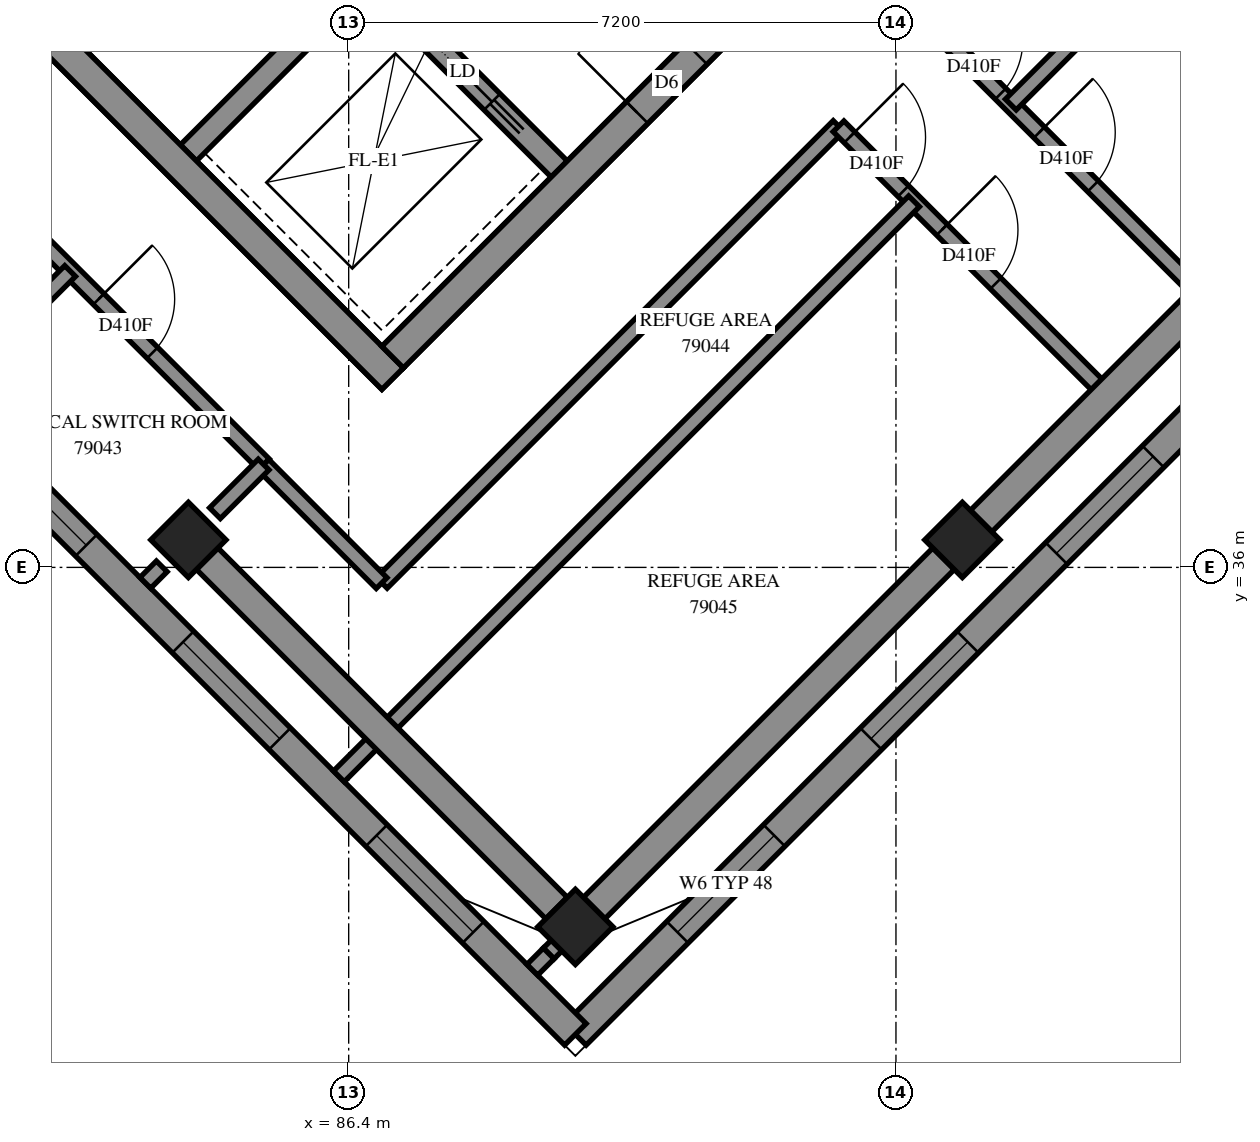
"""IFC4 building model, lengths in metres.
Left out: names, types, materials, properties, quantities, classifications, styles, units other than length and angle.
Written with IfcOpenShell. Run it as: python <this file> out.ifc"""

import sys

from ifc_helpers import new_model, si_unit, direction, frame, frame_2d, origin, origin_2d, place, context, subcontext, project, spatial, polyline, rectangle, outline, extrude, element, fill, save


model = new_model("IFC4")
c1 = context("Model", 3, precision=1e-05, world=origin(), true_north=direction((0.0, 1.0)))
c2 = subcontext(c1, "Body", "Model", "MODEL_VIEW")
j1 = project(units=[si_unit("LENGTHUNIT", "METRE"), si_unit("PLANEANGLEUNIT", "RADIAN")], contexts=[c1])
p1 = place(None, origin())
s1 = spatial("IfcSite", under=j1, at=p1, CompositionType="ELEMENT")
p2 = place(p1, origin())
s2 = spatial("IfcBuilding", under=s1, at=p2, CompositionType="ELEMENT")
p3 = place(p2, frame((0.0, 0.0, 290.6)))
s3 = spatial("IfcBuildingStorey", under=s2, at=p3, CompositionType="ELEMENT", Elevation=290.6)
for number, where, z_axis, x_axis in (
    (1, (84.291, 36.362, 0.0), (0.0, 0.0, 1.0), (0.707, -0.707, 0.0)),
    (2, (94.474, 36.362, 0.0), (0.0, 0.0, 1.0), (0.707, -0.707, 0.0)),
    (3, (89.382, 31.271, 0.0), (0.0, 0.0, 1.0), (0.707, -0.707, 0.0)),
):
    element("IfcColumn", number, at=place(p3, frame(where, z_axis=z_axis, x_axis=x_axis)), inside=s3, PredefinedType="COLUMN", context=c2, shape_type="SweptSolid", body=[
        extrude(rectangle(XDim=0.7, YDim=0.7, at=origin_2d()), origin(), (0.0, 0.0, 1.0), 3.5),
    ])
p4 = place(p3, frame((76.23, 49.231, -0.3), z_axis=(0.0, 0.0, 1.0), x_axis=(0.7071034917, -0.7071100706, 0.0)))
e4 = element("IfcWall", 4, at=p4, inside=s3, PredefinedType="SHEAR", context=c2, shape_type="SweptSolid", body=[
    extrude(rectangle(XDim=15.2, YDim=0.4, at=frame_2d((7.6, 0.0))), origin(), (0.0, 0.0, 1.0), 3.1),
])
p5 = place(p3, frame((86.978, 38.766, -0.3), z_axis=(0.0, 0.0, 1.0), x_axis=(0.7071067812, 0.7071067812, 0.0)))
e5 = element("IfcWall", 5, at=p5, inside=s3, PredefinedType="SHEAR", context=c2, shape_type="SweptSolid", body=[
    extrude(rectangle(XDim=14.4, YDim=0.4, at=frame_2d((7.2, 0.0))), origin(), (0.0, 0.0, 1.0), 3.1),
])
p6 = place(p5, frame((4.55, 0.0, 0.3)))
e6 = element("IfcOpeningElement", 6, at=p6, cuts=e5, PredefinedType="OPENING", context=c2, shape_type="SweptSolid", body=[
    extrude(rectangle(XDim=1.1, YDim=2.1, at=frame_2d((0.55, 1.05))), frame((0.0, 0.21, 0.0), z_axis=(0.0, -1.0, 0.0), x_axis=(1.0, 0.0, 0.0)), (0.0, 0.0, 1.0), 0.42),
])
p7 = place(p5, frame((11.35, 0.0, 0.3)))
e7 = element("IfcOpeningElement", 7, at=p7, cuts=e5, PredefinedType="OPENING", context=c2, shape_type="SweptSolid", body=[
    extrude(rectangle(XDim=1.1, YDim=2.1, at=frame_2d((0.55, 1.05))), frame((0.0, 0.21, 0.0), z_axis=(0.0, -1.0, 0.0), x_axis=(1.0, 0.0, 0.0)), (0.0, 0.0, 1.0), 0.42),
])
p8 = place(p3, frame((84.291, 41.453, 0.0), z_axis=(0.0, 0.0, 1.0), x_axis=(0.7071067812, 0.7071067812, 0.0)))
e8 = element("IfcWall", 8, at=p8, inside=s3, PredefinedType="SOLIDWALL", context=c2, shape_type="SweptSolid", body=[
    extrude(rectangle(XDim=3.3, YDim=0.3, at=frame_2d((1.65, 0.0))), origin(), (0.0, 0.0, 1.0), 3.5),
])
p9 = place(p3, frame((78.988, 51.423, 0.0), z_axis=(0.0, 0.0, 1.0), x_axis=(0.7071067812, -0.7071067812, 0.0)))
e9 = element("IfcWall", 9, at=p9, inside=s3, PredefinedType="SOLIDWALL", context=c2, shape_type="SweptSolid", body=[
    extrude(rectangle(XDim=14.4, YDim=0.3, at=frame_2d((7.2, 0.0))), origin(), (0.0, 0.0, 1.0), 3.5),
])
p10 = place(p9, frame((12.05, 0.0, 0.0)))
e10 = element("IfcOpeningElement", 10, at=p10, cuts=e9, PredefinedType="OPENING", context=c2, shape_type="SweptSolid", body=[
    extrude(rectangle(XDim=1.1, YDim=2.1, at=frame_2d((0.55, 1.05))), frame((0.0, 0.16, 0.0), z_axis=(0.0, -1.0, 0.0), x_axis=(1.0, 0.0, 0.0)), (0.0, 0.0, 1.0), 0.32),
])
p11 = place(p3, frame((89.382, 29.856, 0.0), z_axis=(0.0, 0.0, 1.0), x_axis=(0.7071094407, 0.7071041216, 0.0)))
e11 = element("IfcWall", 11, at=p11, inside=s3, PredefinedType="SOLIDWALL", context=c2, shape_type="SweptSolid", body=[
    extrude(outline(polyline([(-0.2, -0.2), (19.0, -0.2), (18.6, 0.2), (0.2, 0.2), (-0.2, -0.2)])), origin(), (0.0, 0.0, 1.0), 3.0),
])
p12 = place(p11, frame((1.9, 0.0, 0.7)))
e12 = element("IfcOpeningElement", 12, at=p12, cuts=e11, PredefinedType="OPENING", context=c2, shape_type="SweptSolid", body=[
    extrude(rectangle(XDim=1.8, YDim=2.2, at=frame_2d((0.9, 1.1))), frame((0.0, 0.21, 0.0), z_axis=(0.0, -1.0, 0.0), x_axis=(1.0, 0.0, 0.0)), (0.0, 0.0, 1.0), 0.42),
])
p13 = place(p11, frame((5.5, 0.0, 0.7)))
e13 = element("IfcOpeningElement", 13, at=p13, cuts=e11, PredefinedType="OPENING", context=c2, shape_type="SweptSolid", body=[
    extrude(rectangle(XDim=1.8, YDim=2.2, at=frame_2d((0.9, 1.1))), frame((0.0, 0.21, 0.0), z_axis=(0.0, -1.0, 0.0), x_axis=(1.0, 0.0, 0.0)), (0.0, 0.0, 1.0), 0.42),
])
p14 = place(p11, frame((8.95, 0.0, 0.7)))
e14 = element("IfcOpeningElement", 14, at=p14, cuts=e11, PredefinedType="OPENING", context=c2, shape_type="SweptSolid", body=[
    extrude(rectangle(XDim=1.8, YDim=2.2, at=frame_2d((0.9, 1.1))), frame((0.0, 0.21, 0.0), z_axis=(0.0, -1.0, 0.0), x_axis=(1.0, 0.0, 0.0)), (0.0, 0.0, 1.0), 0.42),
])
p15 = place(p11, frame((12.85, 0.0, 0.7)))
e15 = element("IfcOpeningElement", 15, at=p15, cuts=e11, PredefinedType="OPENING", context=c2, shape_type="SweptSolid", body=[
    extrude(rectangle(XDim=1.8, YDim=2.2, at=frame_2d((0.9, 1.1))), frame((0.0, 0.21, 0.0), z_axis=(0.0, -1.0, 0.0), x_axis=(1.0, 0.0, 0.0)), (0.0, 0.0, 1.0), 0.42),
])
p16 = place(p11, frame((16.0, 0.0, 0.7)))
e16 = element("IfcOpeningElement", 16, at=p16, cuts=e11, PredefinedType="OPENING", context=c2, shape_type="SweptSolid", body=[
    extrude(rectangle(XDim=1.8, YDim=2.2, at=frame_2d((0.9, 1.1))), frame((0.0, 0.21, 0.0), z_axis=(0.0, -1.0, 0.0), x_axis=(1.0, 0.0, 0.0)), (0.0, 0.0, 1.0), 0.42),
])
p17 = place(p3, frame((78.297, 40.941, 0.0), z_axis=(0.0, 0.0, 1.0), x_axis=(0.7071035917, -0.7071099707, 0.0)))
e17 = element("IfcWall", 17, at=p17, inside=s3, PredefinedType="SOLIDWALL", context=c2, shape_type="SweptSolid", body=[
    extrude(outline(polyline([(0.047, -0.2), (15.877, -0.2), (15.476, 0.2), (-0.047, 0.2), (0.047, -0.2)])), origin(), (0.0, 0.0, 1.0), 3.5),
])
p18 = place(p17, frame((1.138, 0.0, 0.7)))
e18 = element("IfcOpeningElement", 18, at=p18, cuts=e17, PredefinedType="OPENING", context=c2, shape_type="SweptSolid", body=[
    extrude(rectangle(XDim=1.8, YDim=2.2, at=frame_2d((0.9, 1.1))), frame((0.0, 0.21, 0.0), z_axis=(0.0, -1.0, 0.0), x_axis=(1.0, 0.0, 0.0)), (0.0, 0.0, 1.0), 0.42),
])
p19 = place(p17, frame((4.777, 0.0, 0.7)))
e19 = element("IfcOpeningElement", 19, at=p19, cuts=e17, PredefinedType="OPENING", context=c2, shape_type="SweptSolid", body=[
    extrude(rectangle(XDim=1.8, YDim=2.2, at=frame_2d((0.9, 1.1))), frame((0.0, 0.21, 0.0), z_axis=(0.0, -1.0, 0.0), x_axis=(1.0, 0.0, 0.0)), (0.0, 0.0, 1.0), 0.42),
])
p20 = place(p17, frame((8.377, 0.0, 0.7)))
e20 = element("IfcOpeningElement", 20, at=p20, cuts=e17, PredefinedType="OPENING", context=c2, shape_type="SweptSolid", body=[
    extrude(rectangle(XDim=1.8, YDim=2.2, at=frame_2d((0.9, 1.1))), frame((0.0, 0.21, 0.0), z_axis=(0.0, -1.0, 0.0), x_axis=(1.0, 0.0, 0.0)), (0.0, 0.0, 1.0), 0.42),
])
p21 = place(p17, frame((11.976, 0.0, 0.7)))
e21 = element("IfcOpeningElement", 21, at=p21, cuts=e17, PredefinedType="OPENING", context=c2, shape_type="SweptSolid", body=[
    extrude(rectangle(XDim=1.8, YDim=2.2, at=frame_2d((0.9, 1.1))), frame((0.0, 0.21, 0.0), z_axis=(0.0, -1.0, 0.0), x_axis=(1.0, 0.0, 0.0)), (0.0, 0.0, 1.0), 0.42),
])
p22 = place(p3, frame((86.835, 35.797, 0.0), z_axis=(0.0, 0.0, 1.0), x_axis=(0.7071067812, 0.7071067812, 0.0)))
e22 = element("IfcWall", 22, at=p22, inside=s3, PredefinedType="PARTITIONING", context=c2, shape_type="SweptSolid", body=[
    extrude(rectangle(XDim=8.499, YDim=0.2, at=frame_2d((4.25, 0.0))), origin(), (0.0, 0.0, 1.0), 3.5),
])
p23 = place(p3, frame((89.031, 30.921, 0.0), z_axis=(0.0, 0.0, 1.0), x_axis=(0.7071067812, 0.7071067812, 0.0)))
e23 = element("IfcWall", 23, at=p23, inside=s3, PredefinedType="PARTITIONING", context=c2, shape_type="SweptSolid", body=[
    extrude(rectangle(XDim=8.191, YDim=0.2, at=frame_2d((4.096, 0.0))), origin(), (0.0, 0.0, 1.0), 3.0),
])
p24 = place(p3, frame((94.124, 43.084, 0.0), z_axis=(0.0, 0.0, 1.0), x_axis=(0.7071067812, -0.7071067812, 0.0)))
e24 = element("IfcWall", 24, at=p24, inside=s3, PredefinedType="PARTITIONING", context=c2, shape_type="SweptSolid", body=[
    extrude(rectangle(XDim=5.001, YDim=0.2, at=frame_2d((2.5, 0.0))), origin(), (0.0, 0.0, 1.0), 3.5),
])
p25 = place(p24, frame((0.206, 0.0, 0.0)))
e25 = element("IfcOpeningElement", 25, at=p25, cuts=e24, PredefinedType="OPENING", context=c2, shape_type="SweptSolid", body=[
    extrude(rectangle(XDim=1.0, YDim=2.1, at=frame_2d((0.5, 1.05))), frame((0.0, 0.11, 0.0), z_axis=(0.0, -1.0, 0.0), x_axis=(1.0, 0.0, 0.0)), (0.0, 0.0, 1.0), 0.22),
])
p26 = place(p24, frame((1.925, 0.0, 0.0)))
e26 = element("IfcOpeningElement", 26, at=p26, cuts=e24, PredefinedType="OPENING", context=c2, shape_type="SweptSolid", body=[
    extrude(rectangle(XDim=1.0, YDim=2.1, at=frame_2d((0.5, 1.05))), frame((0.0, 0.11, 0.0), z_axis=(0.0, -1.0, 0.0), x_axis=(1.0, 0.0, 0.0)), (0.0, 0.0, 1.0), 0.22),
])
p27 = place(p3, frame((92.845, 41.803, 0.0), z_axis=(0.0, 0.0, 1.0), x_axis=(0.7071067812, -0.7071067812, 0.0)))
e27 = element("IfcWall", 27, at=p27, inside=s3, PredefinedType="PARTITIONING", context=c2, shape_type="SweptSolid", body=[
    extrude(rectangle(XDim=4.998, YDim=0.2, at=frame_2d((2.499, 0.0))), origin(), (0.0, 0.0, 1.0), 3.5),
])
p28 = place(p27, frame((0.205, 0.0, 0.0)))
e28 = element("IfcOpeningElement", 28, at=p28, cuts=e27, PredefinedType="OPENING", context=c2, shape_type="SweptSolid", body=[
    extrude(rectangle(XDim=1.0, YDim=2.1, at=frame_2d((0.5, 1.05))), frame((0.0, 0.11, 0.0), z_axis=(0.0, -1.0, 0.0), x_axis=(1.0, 0.0, 0.0)), (0.0, 0.0, 1.0), 0.22),
])
p29 = place(p27, frame((1.924, 0.0, 0.0)))
e29 = element("IfcOpeningElement", 29, at=p29, cuts=e27, PredefinedType="OPENING", context=c2, shape_type="SweptSolid", body=[
    extrude(rectangle(XDim=1.0, YDim=2.1, at=frame_2d((0.5, 1.05))), frame((0.0, 0.11, 0.0), z_axis=(0.0, -1.0, 0.0), x_axis=(1.0, 0.0, 0.0)), (0.0, 0.0, 1.0), 0.22),
])
p30 = place(p3, frame((82.18, 40.46, 0.0), z_axis=(0.0, 0.0, 1.0), x_axis=(0.7071067812, -0.7071067812, 0.0)))
e30 = element("IfcWall", 30, at=p30, inside=s3, PredefinedType="PARTITIONING", context=c2, shape_type="SweptSolid", body=[
    extrude(rectangle(XDim=4.391, YDim=0.2, at=frame_2d((2.196, 0.0))), origin(), (0.0, 0.0, 1.0), 3.5),
])
p31 = place(p30, frame((1.316, 0.0, 0.0)))
e31 = element("IfcOpeningElement", 31, at=p31, cuts=e30, PredefinedType="OPENING", context=c2, shape_type="SweptSolid", body=[
    extrude(rectangle(XDim=1.0, YDim=2.1, at=frame_2d((0.5, 1.05))), frame((0.0, 0.11, 0.0), z_axis=(0.0, -1.0, 0.0), x_axis=(1.0, 0.0, 0.0)), (0.0, 0.0, 1.0), 0.22),
])
p32 = place(p3, frame((94.823, 36.713, 0.0), z_axis=(0.0, 0.0, 1.0), x_axis=(0.7066530715, 0.7075602, 0.0)))
e32 = element("IfcWall", 32, at=p32, inside=s3, PredefinedType="PARTITIONING", context=c2, shape_type="SweptSolid", body=[
    extrude(rectangle(XDim=2.205, YDim=0.2, at=frame_2d((1.102, 0.0))), origin(), (0.0, 0.0, 1.0), 3.0),
])
p33 = place(p3, frame((86.833, 35.793, 0.0), z_axis=(0.0, 0.0, 1.0), x_axis=(-0.7068338899, 0.7073795672, 0.0)))
e33 = element("IfcWall", 33, at=p33, inside=s3, PredefinedType="PARTITIONING", context=c2, shape_type="SweptSolid", body=[
    extrude(rectangle(XDim=2.199, YDim=0.2, at=frame_2d((1.1, 0.0))), origin(), (0.0, 0.0, 1.0), 3.5),
])
p34 = place(p3, frame((96.385, 38.269, 0.0), z_axis=(0.0, 0.0, 1.0), x_axis=(0.7076620277, 0.7065510983, 0.0)))
e34 = element("IfcWall", 34, at=p34, inside=s3, PredefinedType="PARTITIONING", context=c2, shape_type="SweptSolid", body=[
    extrude(rectangle(XDim=1.8, YDim=0.2, at=frame_2d((0.9, 0.0))), origin(), (0.0, 0.0, 1.0), 3.0),
])
p35 = place(p3, frame((84.641, 36.713, 0.0), z_axis=(0.0, 0.0, 1.0), x_axis=(0.7071067812, 0.7071067812, 0.0)))
e35 = element("IfcWall", 35, at=p35, inside=s3, PredefinedType="PARTITIONING", context=c2, shape_type="SweptSolid", body=[
    extrude(rectangle(XDim=0.905, YDim=0.2, at=frame_2d((0.453, 0.0))), origin(), (0.0, 0.0, 1.0), 3.5),
])
p36 = place(p3, frame((86.271, 33.251, 0.0), z_axis=(0.0, 0.0, 1.0), x_axis=(0.7071908866, 0.7070226658, 0.0)))
e36 = element("IfcWall", 36, at=p36, inside=s3, PredefinedType="PARTITIONING", context=c2, shape_type="SweptSolid", body=[
    extrude(outline(polyline([(0.0, -0.1), (10.7, -0.1), (10.7, 0.1), (0.0, 0.1), (0.0, -0.1)])), origin(), (0.0, 0.0, 1.0), 3.5),
])
p37 = place(p3, frame((95.111, 42.089, 0.0), z_axis=(0.0, 0.0, 1.0), x_axis=(0.7072762658, 0.7069372559, 0.0)))
e37 = element("IfcWall", 37, at=p37, inside=s3, PredefinedType="PARTITIONING", context=c2, shape_type="SweptSolid", body=[
    extrude(outline(polyline([(0.0, -0.1), (5.899, -0.1), (5.899, 0.1), (0.0, 0.1), (0.0, -0.1)])), origin(), (0.0, 0.0, 1.0), 3.5),
])
p38 = place(p3, frame((81.179, 38.343, 0.0), z_axis=(0.0, 0.0, 1.0), x_axis=(0.7071067812, 0.7071067812, 0.0)))
e38 = element("IfcWall", 38, at=p38, inside=s3, PredefinedType="PARTITIONING", context=c2, shape_type="SweptSolid", body=[
    extrude(outline(polyline([(0.0, -0.1), (2.201, -0.1), (2.201, 0.1), (0.0, 0.1), (0.0, -0.1)])), origin(), (0.0, 0.0, 1.0), 3.5),
])
p39 = place(p3, frame((83.725, 35.797, 0.0), z_axis=(0.0, 0.0, 1.0), x_axis=(0.7069432694, 0.7072702552, 0.0)))
e39 = element("IfcWall", 39, at=p39, inside=s3, PredefinedType="PARTITIONING", context=c2, shape_type="SweptSolid", body=[
    extrude(outline(polyline([(0.0, -0.1), (0.306, -0.1), (0.306, 0.1), (0.0, 0.1), (0.0, -0.1)])), origin(), (0.0, 0.0, 1.0), 3.5),
])
p40 = place(p3, frame((88.816, 30.706, 0.0), z_axis=(0.0, 0.0, 1.0), x_axis=(0.7071067812, 0.7071067812, 0.0)))
e40 = element("IfcWall", 40, at=p40, inside=s3, PredefinedType="PARTITIONING", context=c2, shape_type="SweptSolid", body=[
    extrude(outline(polyline([(0.0, -0.1), (0.304, -0.1), (0.304, 0.1), (0.0, 0.1), (0.0, -0.1)])), origin(), (0.0, 0.0, 1.0), 3.5),
])
p41 = place(p12, origin())
e41 = element("IfcWindow", 41, at=p41, inside=s3, PartitioningType="SINGLE_PANEL", PredefinedType="WINDOW", context=c2, shape_type="SweptSolid", body=[
    extrude(rectangle(XDim=1.8, YDim=2.2, at=frame_2d((0.9, 1.1))), frame((0.0, 0.08, 0.0), z_axis=(0.0, -1.0, 0.0), x_axis=(1.0, 0.0, 0.0)), (0.0, 0.0, 1.0), 0.06),
])
fill(e12, e41)
p42 = place(p13, origin())
e42 = element("IfcWindow", 42, at=p42, inside=s3, PartitioningType="SINGLE_PANEL", PredefinedType="WINDOW", context=c2, shape_type="SweptSolid", body=[
    extrude(rectangle(XDim=1.8, YDim=2.2, at=frame_2d((0.9, 1.1))), frame((0.0, 0.08, 0.0), z_axis=(0.0, -1.0, 0.0), x_axis=(1.0, 0.0, 0.0)), (0.0, 0.0, 1.0), 0.06),
])
fill(e13, e42)
p43 = place(p14, origin())
e43 = element("IfcWindow", 43, at=p43, inside=s3, PartitioningType="SINGLE_PANEL", PredefinedType="WINDOW", context=c2, shape_type="SweptSolid", body=[
    extrude(rectangle(XDim=1.8, YDim=2.2, at=frame_2d((0.9, 1.1))), frame((0.0, 0.08, 0.0), z_axis=(0.0, -1.0, 0.0), x_axis=(1.0, 0.0, 0.0)), (0.0, 0.0, 1.0), 0.06),
])
fill(e14, e43)
p44 = place(p19, origin())
e44 = element("IfcWindow", 44, at=p44, inside=s3, PartitioningType="SINGLE_PANEL", PredefinedType="WINDOW", context=c2, shape_type="SweptSolid", body=[
    extrude(rectangle(XDim=1.8, YDim=2.2, at=frame_2d((0.9, 1.1))), frame((0.0, 0.08, 0.0), z_axis=(0.0, -1.0, 0.0), x_axis=(1.0, 0.0, 0.0)), (0.0, 0.0, 1.0), 0.06),
])
fill(e19, e44)
p45 = place(p20, origin())
e45 = element("IfcWindow", 45, at=p45, inside=s3, PartitioningType="SINGLE_PANEL", PredefinedType="WINDOW", context=c2, shape_type="SweptSolid", body=[
    extrude(rectangle(XDim=1.8, YDim=2.2, at=frame_2d((0.9, 1.1))), frame((0.0, 0.08, 0.0), z_axis=(0.0, -1.0, 0.0), x_axis=(1.0, 0.0, 0.0)), (0.0, 0.0, 1.0), 0.06),
])
fill(e20, e45)
p46 = place(p21, origin())
e46 = element("IfcWindow", 46, at=p46, inside=s3, PartitioningType="SINGLE_PANEL", PredefinedType="WINDOW", context=c2, shape_type="SweptSolid", body=[
    extrude(rectangle(XDim=1.8, YDim=2.2, at=frame_2d((0.9, 1.1))), frame((0.0, 0.08, 0.0), z_axis=(0.0, -1.0, 0.0), x_axis=(1.0, 0.0, 0.0)), (0.0, 0.0, 1.0), 0.06),
])
fill(e21, e46)
p47 = place(p6, origin())
e47 = element("IfcDoor", 47, at=p47, inside=s3, OperationType="DOUBLE_DOOR_SINGLE_SWING", PredefinedType="DOOR", context=c2, shape_type="SweptSolid", body=[
    extrude(rectangle(XDim=1.1, YDim=2.1, at=frame_2d((0.55, 1.05))), frame((0.0, 0.025, 0.0), z_axis=(0.0, -1.0, 0.0), x_axis=(1.0, 0.0, 0.0)), (0.0, 0.0, 1.0), 0.05),
])
fill(e6, e47)
p48 = place(p10, origin())
e48 = element("IfcDoor", 48, at=p48, inside=s3, OperationType="SLIDING_TO_RIGHT", PredefinedType="DOOR", context=c2, shape_type="SweptSolid", body=[
    extrude(rectangle(XDim=1.1, YDim=2.1, at=frame_2d((0.55, 1.05))), frame((0.0, 0.025, 0.0), z_axis=(0.0, -1.0, 0.0), x_axis=(1.0, 0.0, 0.0)), (0.0, 0.0, 1.0), 0.05),
])
fill(e10, e48)
p49 = place(p25, origin())
e49 = element("IfcDoor", 49, at=p49, inside=s3, OperationType="SINGLE_SWING_LEFT", PredefinedType="DOOR", context=c2, shape_type="SweptSolid", body=[
    extrude(rectangle(XDim=1.0, YDim=2.1, at=frame_2d((0.5, 1.05))), frame((0.0, 0.025, 0.0), z_axis=(0.0, -1.0, 0.0), x_axis=(1.0, 0.0, 0.0)), (0.0, 0.0, 1.0), 0.05),
])
fill(e25, e49)
p50 = place(p31, origin())
e50 = element("IfcDoor", 50, at=p50, inside=s3, OperationType="SINGLE_SWING_LEFT", PredefinedType="DOOR", context=c2, shape_type="SweptSolid", body=[
    extrude(rectangle(XDim=1.0, YDim=2.1, at=frame_2d((0.5, 1.05))), frame((0.0, 0.025, 0.0), z_axis=(0.0, -1.0, 0.0), x_axis=(1.0, 0.0, 0.0)), (0.0, 0.0, 1.0), 0.05),
])
fill(e31, e50)
p51 = place(p28, origin())
e51 = element("IfcDoor", 51, at=p51, inside=s3, OperationType="SINGLE_SWING_RIGHT", PredefinedType="DOOR", context=c2, shape_type="SweptSolid", body=[
    extrude(rectangle(XDim=1.0, YDim=2.1, at=frame_2d((0.5, 1.05))), frame((0.0, 0.025, 0.0), z_axis=(0.0, -1.0, 0.0), x_axis=(1.0, 0.0, 0.0)), (0.0, 0.0, 1.0), 0.05),
])
fill(e28, e51)
p52 = place(p29, origin())
e52 = element("IfcDoor", 52, at=p52, inside=s3, OperationType="SINGLE_SWING_LEFT", PredefinedType="DOOR", context=c2, shape_type="SweptSolid", body=[
    extrude(rectangle(XDim=1.0, YDim=2.1, at=frame_2d((0.5, 1.05))), frame((0.0, 0.025, 0.0), z_axis=(0.0, -1.0, 0.0), x_axis=(1.0, 0.0, 0.0)), (0.0, 0.0, 1.0), 0.05),
])
fill(e29, e52)
p53 = place(p26, origin())
e53 = element("IfcDoor", 53, at=p53, inside=s3, OperationType="SINGLE_SWING_RIGHT", PredefinedType="DOOR", context=c2, shape_type="SweptSolid", body=[
    extrude(rectangle(XDim=1.0, YDim=2.1, at=frame_2d((0.5, 1.05))), frame((0.0, 0.025, 0.0), z_axis=(0.0, -1.0, 0.0), x_axis=(1.0, 0.0, 0.0)), (0.0, 0.0, 1.0), 0.05),
])
fill(e26, e53)
save(model, sys.argv[1])
